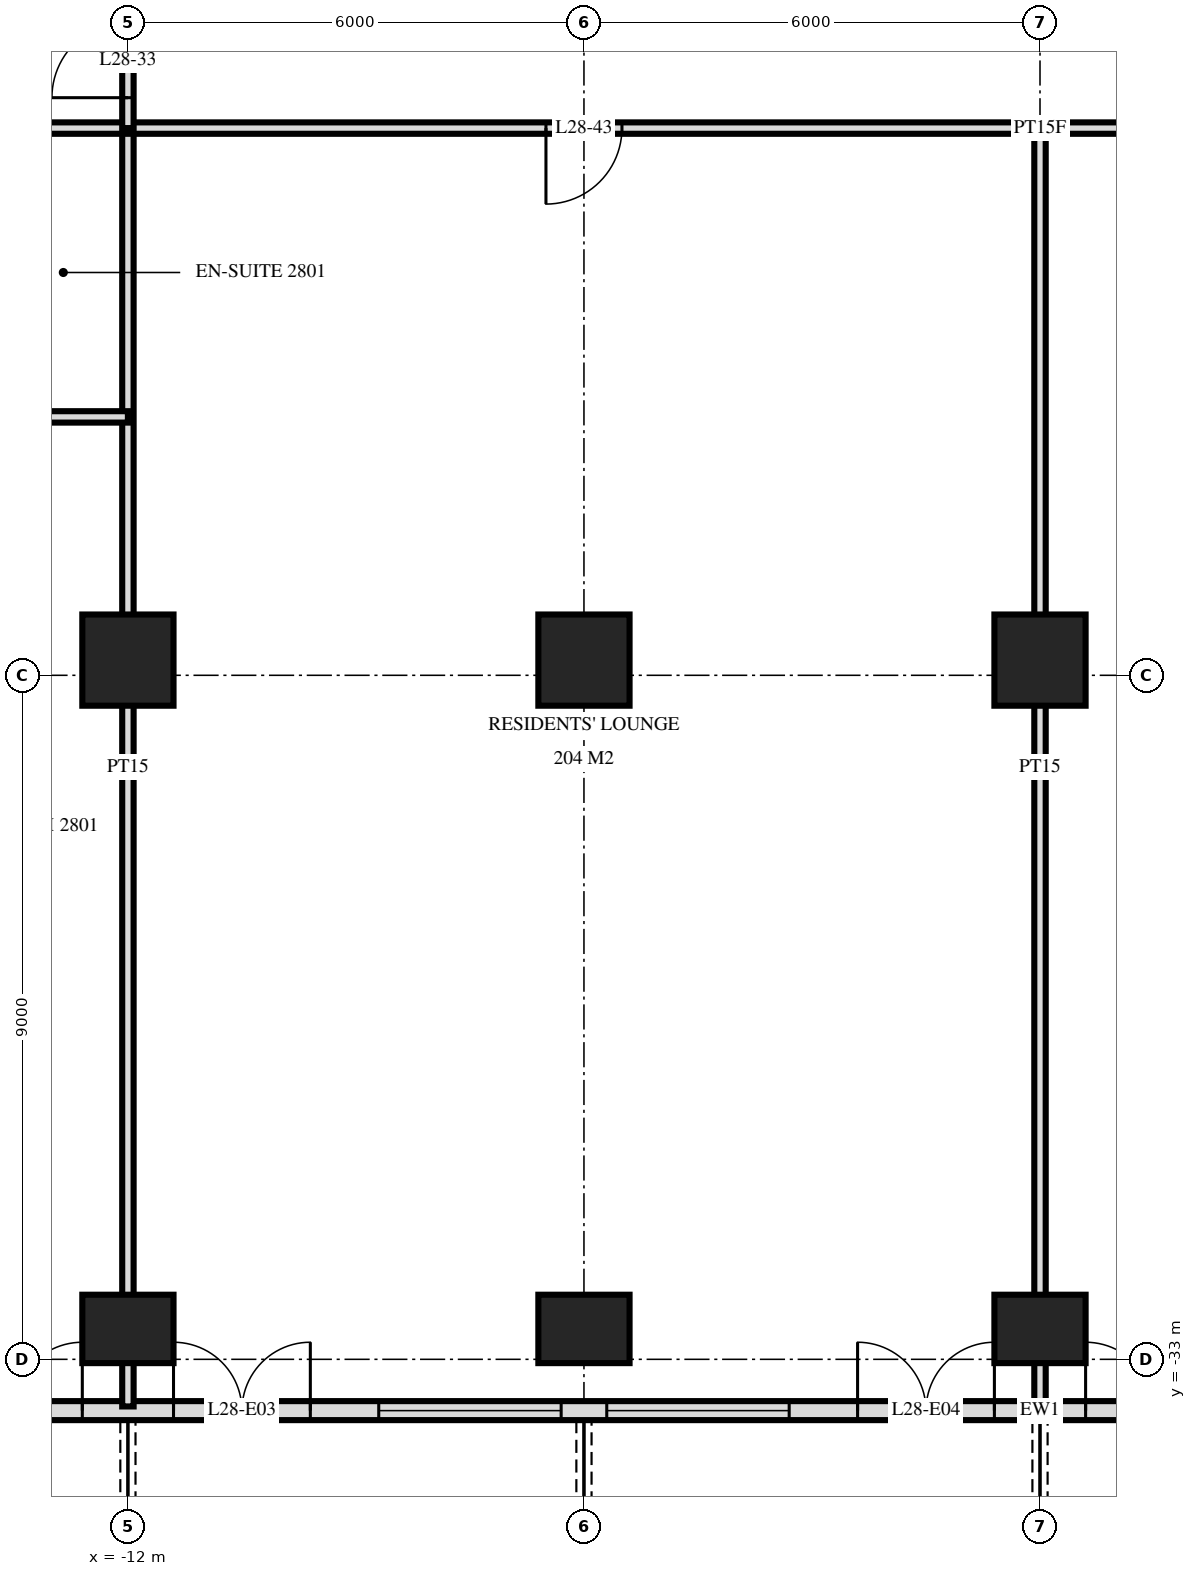
"""IFC4 building model, lengths in metres.
Left out: names, types, materials, properties, quantities, classifications, styles, units other than length and angle.
Written with IfcOpenShell. Run it as: python <this file> out.ifc"""

import sys

from ifc_helpers import new_model, si_unit, direction, frame, frame_2d, origin, origin_2d, place, context, subcontext, project, spatial, rectangle, extrude, element, fill, save


model = new_model("IFC4")
c1 = context("Model", 3, precision=1e-05, world=origin(), true_north=direction((0.0, 1.0)))
c2 = subcontext(c1, "Body", "Model", "MODEL_VIEW")
j1 = project(units=[si_unit("LENGTHUNIT", "METRE"), si_unit("PLANEANGLEUNIT", "RADIAN")], contexts=[c1])
p1 = place(None, origin())
s1 = spatial("IfcSite", under=j1, at=p1, CompositionType="ELEMENT")
p2 = place(p1, origin())
s2 = spatial("IfcBuilding", under=s1, at=p2, CompositionType="ELEMENT")
p3 = place(p2, frame((0.0, 0.0, 112.8)))
s3 = spatial("IfcBuildingStorey", under=s2, at=p3, CompositionType="ELEMENT", Elevation=112.8)
p4 = place(p3, frame((-12.0, -32.6, -0.28), z_axis=(0.0, 0.0, 1.0), x_axis=(1.0, 0.0, 0.0)))
e1 = element("IfcColumn", 1, at=p4, inside=s3, PredefinedType="COLUMN", context=c2, shape_type="SweptSolid", body=[
    extrude(rectangle(XDim=1.2, YDim=0.9, at=origin_2d()), origin(), (0.0, 0.0, 1.0), 3.88),
])
p5 = place(p3, frame((-12.0, -23.8, -0.28), z_axis=(0.0, 0.0, 1.0), x_axis=(1.0, 0.0, 0.0)))
e2 = element("IfcColumn", 2, at=p5, inside=s3, PredefinedType="COLUMN", context=c2, shape_type="SweptSolid", body=[
    extrude(rectangle(XDim=1.2, YDim=1.2, at=origin_2d()), origin(), (0.0, 0.0, 1.0), 3.88),
])
p6 = place(p3, frame((-6.0, -32.6, -0.28), z_axis=(0.0, 0.0, 1.0), x_axis=(1.0, 0.0, 0.0)))
e3 = element("IfcColumn", 3, at=p6, inside=s3, PredefinedType="COLUMN", context=c2, shape_type="SweptSolid", body=[
    extrude(rectangle(XDim=1.2, YDim=0.9, at=origin_2d()), origin(), (0.0, 0.0, 1.0), 3.88),
])
p7 = place(p3, frame((-6.0, -23.8, -0.28), z_axis=(0.0, 0.0, 1.0), x_axis=(1.0, 0.0, 0.0)))
e4 = element("IfcColumn", 4, at=p7, inside=s3, PredefinedType="COLUMN", context=c2, shape_type="SweptSolid", body=[
    extrude(rectangle(XDim=1.2, YDim=1.2, at=origin_2d()), origin(), (0.0, 0.0, 1.0), 3.88),
])
p8 = place(p3, frame((0.0, -32.6, -0.28), z_axis=(0.0, 0.0, 1.0), x_axis=(1.0, 0.0, 0.0)))
e5 = element("IfcColumn", 5, at=p8, inside=s3, PredefinedType="COLUMN", context=c2, shape_type="SweptSolid", body=[
    extrude(rectangle(XDim=1.2, YDim=0.9, at=origin_2d()), origin(), (0.0, 0.0, 1.0), 3.88),
])
p9 = place(p3, frame((0.0, -23.8, -0.28), z_axis=(0.0, 0.0, 1.0), x_axis=(1.0, 0.0, 0.0)))
e6 = element("IfcColumn", 6, at=p9, inside=s3, PredefinedType="COLUMN", context=c2, shape_type="SweptSolid", body=[
    extrude(rectangle(XDim=1.2, YDim=1.2, at=origin_2d()), origin(), (0.0, 0.0, 1.0), 3.88),
])
p10 = place(p3, frame((-23.675, -33.675, 0.0), z_axis=(0.0, 0.0, 1.0), x_axis=(1.0, 0.0, 0.0)))
e7 = element("IfcWall", 7, at=p10, inside=s3, PredefinedType="SOLIDWALL", context=c2, shape_type="SweptSolid", body=[
    extrude(rectangle(XDim=47.351, YDim=0.25, at=frame_2d((23.675, 0.0))), origin(), (0.0, 0.0, 1.0), 3.32),
])
p11 = place(p10, frame((0.275, 0.0, 0.3)))
e8 = element("IfcOpeningElement", 8, at=p11, cuts=e7, PredefinedType="OPENING", context=c2, shape_type="SweptSolid", body=[
    extrude(rectangle(XDim=2.4, YDim=2.1, at=frame_2d((1.2, 1.05))), frame((0.0, 0.135, 0.0), z_axis=(0.0, -1.0, 0.0), x_axis=(1.0, 0.0, 0.0)), (0.0, 0.0, 1.0), 0.27),
])
p12 = place(p10, frame((3.425, 0.0, 0.0)))
e9 = element("IfcOpeningElement", 9, at=p12, cuts=e7, PredefinedType="OPENING", context=c2, shape_type="SweptSolid", body=[
    extrude(rectangle(XDim=1.8, YDim=2.4, at=frame_2d((0.9, 1.2))), frame((0.0, 0.135, 0.0), z_axis=(0.0, -1.0, 0.0), x_axis=(1.0, 0.0, 0.0)), (0.0, 0.0, 1.0), 0.27),
])
p13 = place(p10, frame((5.975, 0.0, 0.3)))
e10 = element("IfcOpeningElement", 10, at=p13, cuts=e7, PredefinedType="OPENING", context=c2, shape_type="SweptSolid", body=[
    extrude(rectangle(XDim=2.4, YDim=2.1, at=frame_2d((1.2, 1.05))), frame((0.0, 0.135, 0.0), z_axis=(0.0, -1.0, 0.0), x_axis=(1.0, 0.0, 0.0)), (0.0, 0.0, 1.0), 0.27),
])
p14 = place(p10, frame((9.275, 0.0, 0.0)))
e11 = element("IfcOpeningElement", 11, at=p14, cuts=e7, PredefinedType="OPENING", context=c2, shape_type="SweptSolid", body=[
    extrude(rectangle(XDim=1.8, YDim=2.4, at=frame_2d((0.9, 1.2))), frame((0.0, 0.135, 0.0), z_axis=(0.0, -1.0, 0.0), x_axis=(1.0, 0.0, 0.0)), (0.0, 0.0, 1.0), 0.27),
])
p15 = place(p10, frame((12.275, 0.0, 0.0)))
e12 = element("IfcOpeningElement", 12, at=p15, cuts=e7, PredefinedType="OPENING", context=c2, shape_type="SweptSolid", body=[
    extrude(rectangle(XDim=1.8, YDim=2.4, at=frame_2d((0.9, 1.2))), frame((0.0, 0.135, 0.0), z_axis=(0.0, -1.0, 0.0), x_axis=(1.0, 0.0, 0.0)), (0.0, 0.0, 1.0), 0.27),
])
p16 = place(p10, frame((14.975, 0.0, 0.3)))
e13 = element("IfcOpeningElement", 13, at=p16, cuts=e7, PredefinedType="OPENING", context=c2, shape_type="SweptSolid", body=[
    extrude(rectangle(XDim=2.4, YDim=2.1, at=frame_2d((1.2, 1.05))), frame((0.0, 0.135, 0.0), z_axis=(0.0, -1.0, 0.0), x_axis=(1.0, 0.0, 0.0)), (0.0, 0.0, 1.0), 0.27),
])
p17 = place(p10, frame((17.975, 0.0, 0.3)))
e14 = element("IfcOpeningElement", 14, at=p17, cuts=e7, PredefinedType="OPENING", context=c2, shape_type="SweptSolid", body=[
    extrude(rectangle(XDim=2.4, YDim=2.1, at=frame_2d((1.2, 1.05))), frame((0.0, 0.135, 0.0), z_axis=(0.0, -1.0, 0.0), x_axis=(1.0, 0.0, 0.0)), (0.0, 0.0, 1.0), 0.27),
])
p18 = place(p10, frame((21.275, 0.0, 0.0)))
e15 = element("IfcOpeningElement", 15, at=p18, cuts=e7, PredefinedType="OPENING", context=c2, shape_type="SweptSolid", body=[
    extrude(rectangle(XDim=1.8, YDim=2.4, at=frame_2d((0.9, 1.2))), frame((0.0, 0.135, 0.0), z_axis=(0.0, -1.0, 0.0), x_axis=(1.0, 0.0, 0.0)), (0.0, 0.0, 1.0), 0.27),
])
p19 = place(p10, frame((24.275, 0.0, 0.0)))
e16 = element("IfcOpeningElement", 16, at=p19, cuts=e7, PredefinedType="OPENING", context=c2, shape_type="SweptSolid", body=[
    extrude(rectangle(XDim=1.8, YDim=2.4, at=frame_2d((0.9, 1.2))), frame((0.0, 0.135, 0.0), z_axis=(0.0, -1.0, 0.0), x_axis=(1.0, 0.0, 0.0)), (0.0, 0.0, 1.0), 0.27),
])
p20 = place(p10, frame((26.975, 0.0, 0.3)))
e17 = element("IfcOpeningElement", 17, at=p20, cuts=e7, PredefinedType="OPENING", context=c2, shape_type="SweptSolid", body=[
    extrude(rectangle(XDim=2.4, YDim=2.1, at=frame_2d((1.2, 1.05))), frame((0.0, 0.135, 0.0), z_axis=(0.0, -1.0, 0.0), x_axis=(1.0, 0.0, 0.0)), (0.0, 0.0, 1.0), 0.27),
])
p21 = place(p10, frame((30.275, 0.0, 0.0)))
e18 = element("IfcOpeningElement", 18, at=p21, cuts=e7, PredefinedType="OPENING", context=c2, shape_type="SweptSolid", body=[
    extrude(rectangle(XDim=1.8, YDim=2.4, at=frame_2d((0.9, 1.2))), frame((0.0, 0.135, 0.0), z_axis=(0.0, -1.0, 0.0), x_axis=(1.0, 0.0, 0.0)), (0.0, 0.0, 1.0), 0.27),
])
p22 = place(p10, frame((32.975, 0.0, 0.3)))
e19 = element("IfcOpeningElement", 19, at=p22, cuts=e7, PredefinedType="OPENING", context=c2, shape_type="SweptSolid", body=[
    extrude(rectangle(XDim=2.4, YDim=2.1, at=frame_2d((1.2, 1.05))), frame((0.0, 0.135, 0.0), z_axis=(0.0, -1.0, 0.0), x_axis=(1.0, 0.0, 0.0)), (0.0, 0.0, 1.0), 0.27),
])
p23 = place(p10, frame((35.975, 0.0, 0.3)))
e20 = element("IfcOpeningElement", 20, at=p23, cuts=e7, PredefinedType="OPENING", context=c2, shape_type="SweptSolid", body=[
    extrude(rectangle(XDim=2.4, YDim=2.1, at=frame_2d((1.2, 1.05))), frame((0.0, 0.135, 0.0), z_axis=(0.0, -1.0, 0.0), x_axis=(1.0, 0.0, 0.0)), (0.0, 0.0, 1.0), 0.27),
])
p24 = place(p10, frame((39.275, 0.0, 0.0)))
e21 = element("IfcOpeningElement", 21, at=p24, cuts=e7, PredefinedType="OPENING", context=c2, shape_type="SweptSolid", body=[
    extrude(rectangle(XDim=1.8, YDim=2.4, at=frame_2d((0.9, 1.2))), frame((0.0, 0.135, 0.0), z_axis=(0.0, -1.0, 0.0), x_axis=(1.0, 0.0, 0.0)), (0.0, 0.0, 1.0), 0.27),
])
p25 = place(p10, frame((41.975, 0.0, 0.3)))
e22 = element("IfcOpeningElement", 22, at=p25, cuts=e7, PredefinedType="OPENING", context=c2, shape_type="SweptSolid", body=[
    extrude(rectangle(XDim=2.4, YDim=2.1, at=frame_2d((1.2, 1.05))), frame((0.0, 0.135, 0.0), z_axis=(0.0, -1.0, 0.0), x_axis=(1.0, 0.0, 0.0)), (0.0, 0.0, 1.0), 0.27),
])
p26 = place(p10, frame((45.125, 0.0, 0.0)))
e23 = element("IfcOpeningElement", 23, at=p26, cuts=e7, PredefinedType="OPENING", context=c2, shape_type="SweptSolid", body=[
    extrude(rectangle(XDim=1.8, YDim=2.4, at=frame_2d((0.9, 1.2))), frame((0.0, 0.135, 0.0), z_axis=(0.0, -1.0, 0.0), x_axis=(1.0, 0.0, 0.0)), (0.0, 0.0, 1.0), 0.27),
])
p27 = place(p3, frame((0.0, -33.62, 0.0), z_axis=(0.0, 0.0, 1.0), x_axis=(0.0, 1.0, 0.0)))
e24 = element("IfcWall", 24, at=p27, inside=s3, PredefinedType="PARTITIONING", context=c2, shape_type="SweptSolid", body=[
    extrude(rectangle(XDim=16.82, YDim=0.15, at=frame_2d((8.41, 0.0))), origin(), (0.0, 0.0, 1.0), 3.32),
])
p28 = place(p3, frame((-12.0, -16.8, 0.0), z_axis=(0.0, 0.0, 1.0), x_axis=(0.0, 1.0, 0.0)))
e25 = element("IfcWall", 25, at=p28, inside=s3, PredefinedType="PARTITIONING", context=c2, shape_type="SweptSolid", body=[
    extrude(rectangle(XDim=1.75, YDim=0.15, at=frame_2d((0.875, 0.0))), origin(), (0.0, 0.0, 1.0), 3.32),
])
p29 = place(p28, frame((0.4, 0.0, 0.0)))
e26 = element("IfcOpeningElement", 26, at=p29, cuts=e25, PredefinedType="OPENING", context=c2, shape_type="SweptSolid", body=[
    extrude(rectangle(XDim=1.0, YDim=2.1, at=frame_2d((0.5, 1.05))), frame((0.0, 0.085, 0.0), z_axis=(0.0, -1.0, 0.0), x_axis=(1.0, 0.0, 0.0)), (0.0, 0.0, 1.0), 0.17),
])
p30 = place(p3, frame((-12.0, -33.62, 0.0), z_axis=(0.0, 0.0, 1.0), x_axis=(0.0, 1.0, 0.0)))
e27 = element("IfcWall", 27, at=p30, inside=s3, PredefinedType="PARTITIONING", context=c2, shape_type="SweptSolid", body=[
    extrude(rectangle(XDim=16.82, YDim=0.15, at=frame_2d((8.41, 0.0))), origin(), (0.0, 0.0, 1.0), 3.32),
])
p31 = place(p3, frame((-13.7, -20.6, 0.0), z_axis=(0.0, 0.0, 1.0), x_axis=(1.0, 0.0, 0.0)))
e28 = element("IfcWall", 28, at=p31, inside=s3, PredefinedType="PARTITIONING", context=c2, shape_type="SweptSolid", body=[
    extrude(rectangle(XDim=1.7, YDim=0.15, at=frame_2d((0.85, 0.0))), origin(), (0.0, 0.0, 1.0), 3.32),
])
p32 = place(p3, frame((-28.02, -16.8, 0.0), z_axis=(0.0, 0.0, 1.0), x_axis=(1.0, 0.0, 0.0)))
e29 = element("IfcWall", 29, at=p32, inside=s3, PredefinedType="PARTITIONING", context=c2, shape_type="SweptSolid", body=[
    extrude(rectangle(XDim=56.04, YDim=0.15, at=frame_2d((28.02, 0.0))), origin(), (0.0, 0.0, 1.0), 3.32),
])
p33 = place(p32, frame((13.17, 0.0, 0.0)))
e30 = element("IfcOpeningElement", 30, at=p33, cuts=e29, PredefinedType="OPENING", context=c2, shape_type="SweptSolid", body=[
    extrude(rectangle(XDim=1.0, YDim=2.1, at=frame_2d((0.5, 1.05))), frame((0.0, 0.085, 0.0), z_axis=(0.0, -1.0, 0.0), x_axis=(1.0, 0.0, 0.0)), (0.0, 0.0, 1.0), 0.17),
])
p34 = place(p32, frame((11.87, 0.0, 0.0)))
e31 = element("IfcOpeningElement", 31, at=p34, cuts=e29, PredefinedType="OPENING", context=c2, shape_type="SweptSolid", body=[
    extrude(rectangle(XDim=1.0, YDim=2.1, at=frame_2d((0.5, 1.05))), frame((0.0, 0.085, 0.0), z_axis=(0.0, -1.0, 0.0), x_axis=(1.0, 0.0, 0.0)), (0.0, 0.0, 1.0), 0.17),
])
p35 = place(p32, frame((8.32, 0.0, 0.0)))
e32 = element("IfcOpeningElement", 32, at=p35, cuts=e29, PredefinedType="OPENING", context=c2, shape_type="SweptSolid", body=[
    extrude(rectangle(XDim=1.0, YDim=2.1, at=frame_2d((0.5, 1.05))), frame((0.0, 0.085, 0.0), z_axis=(0.0, -1.0, 0.0), x_axis=(1.0, 0.0, 0.0)), (0.0, 0.0, 1.0), 0.17),
])
p36 = place(p32, frame((40.42, 0.0, 0.0)))
e33 = element("IfcOpeningElement", 33, at=p36, cuts=e29, PredefinedType="OPENING", context=c2, shape_type="SweptSolid", body=[
    extrude(rectangle(XDim=1.0, YDim=2.1, at=frame_2d((0.5, 1.05))), frame((0.0, 0.085, 0.0), z_axis=(0.0, -1.0, 0.0), x_axis=(1.0, 0.0, 0.0)), (0.0, 0.0, 1.0), 0.17),
])
p37 = place(p32, frame((46.72, 0.0, 0.0)))
e34 = element("IfcOpeningElement", 34, at=p37, cuts=e29, PredefinedType="OPENING", context=c2, shape_type="SweptSolid", body=[
    extrude(rectangle(XDim=1.0, YDim=2.1, at=frame_2d((0.5, 1.05))), frame((0.0, 0.085, 0.0), z_axis=(0.0, -1.0, 0.0), x_axis=(1.0, 0.0, 0.0)), (0.0, 0.0, 1.0), 0.17),
])
p38 = place(p32, frame((21.52, 0.0, 0.0)))
e35 = element("IfcOpeningElement", 35, at=p38, cuts=e29, PredefinedType="OPENING", context=c2, shape_type="SweptSolid", body=[
    extrude(rectangle(XDim=1.0, YDim=2.1, at=frame_2d((0.5, 1.05))), frame((0.0, 0.085, 0.0), z_axis=(0.0, -1.0, 0.0), x_axis=(1.0, 0.0, 0.0)), (0.0, 0.0, 1.0), 0.17),
])
p39 = place(p32, frame((30.52, 0.0, 0.0)))
e36 = element("IfcOpeningElement", 36, at=p39, cuts=e29, PredefinedType="OPENING", context=c2, shape_type="SweptSolid", body=[
    extrude(rectangle(XDim=1.0, YDim=2.1, at=frame_2d((0.5, 1.05))), frame((0.0, 0.085, 0.0), z_axis=(0.0, -1.0, 0.0), x_axis=(1.0, 0.0, 0.0)), (0.0, 0.0, 1.0), 0.17),
])
p40 = place(p32, frame((36.52, 0.0, 0.0)))
e37 = element("IfcOpeningElement", 37, at=p40, cuts=e29, PredefinedType="OPENING", context=c2, shape_type="SweptSolid", body=[
    extrude(rectangle(XDim=1.0, YDim=2.1, at=frame_2d((0.5, 1.05))), frame((0.0, 0.085, 0.0), z_axis=(0.0, -1.0, 0.0), x_axis=(1.0, 0.0, 0.0)), (0.0, 0.0, 1.0), 0.17),
])
p41 = place(p14, origin())
e38 = element("IfcDoor", 38, at=p41, inside=s3, OperationType="DOUBLE_DOOR_SINGLE_SWING", PredefinedType="DOOR", context=c2, shape_type="SweptSolid", body=[
    extrude(rectangle(XDim=1.8, YDim=2.4, at=frame_2d((0.9, 1.2))), frame((0.0, 0.025, 0.0), z_axis=(0.0, -1.0, 0.0), x_axis=(1.0, 0.0, 0.0)), (0.0, 0.0, 1.0), 0.05),
])
fill(e11, e38)
p42 = place(p15, origin())
e39 = element("IfcDoor", 39, at=p42, inside=s3, OperationType="DOUBLE_DOOR_SINGLE_SWING", PredefinedType="DOOR", context=c2, shape_type="SweptSolid", body=[
    extrude(rectangle(XDim=1.8, YDim=2.4, at=frame_2d((0.9, 1.2))), frame((0.0, 0.025, 0.0), z_axis=(0.0, -1.0, 0.0), x_axis=(1.0, 0.0, 0.0)), (0.0, 0.0, 1.0), 0.05),
])
fill(e12, e39)
p43 = place(p16, origin())
e40 = element("IfcWindow", 40, at=p43, inside=s3, PartitioningType="SINGLE_PANEL", PredefinedType="WINDOW", context=c2, shape_type="SweptSolid", body=[
    extrude(rectangle(XDim=2.4, YDim=2.1, at=frame_2d((1.2, 1.05))), frame((0.0, 0.03, 0.0), z_axis=(0.0, -1.0, 0.0), x_axis=(1.0, 0.0, 0.0)), (0.0, 0.0, 1.0), 0.06),
])
fill(e13, e40)
p44 = place(p17, origin())
e41 = element("IfcWindow", 41, at=p44, inside=s3, PartitioningType="SINGLE_PANEL", PredefinedType="WINDOW", context=c2, shape_type="SweptSolid", body=[
    extrude(rectangle(XDim=2.4, YDim=2.1, at=frame_2d((1.2, 1.05))), frame((0.0, 0.03, 0.0), z_axis=(0.0, -1.0, 0.0), x_axis=(1.0, 0.0, 0.0)), (0.0, 0.0, 1.0), 0.06),
])
fill(e14, e41)
p45 = place(p18, origin())
e42 = element("IfcDoor", 42, at=p45, inside=s3, OperationType="DOUBLE_DOOR_SINGLE_SWING", PredefinedType="DOOR", context=c2, shape_type="SweptSolid", body=[
    extrude(rectangle(XDim=1.8, YDim=2.4, at=frame_2d((0.9, 1.2))), frame((0.0, 0.025, 0.0), z_axis=(0.0, -1.0, 0.0), x_axis=(1.0, 0.0, 0.0)), (0.0, 0.0, 1.0), 0.05),
])
fill(e15, e42)
p46 = place(p19, origin())
e43 = element("IfcDoor", 43, at=p46, inside=s3, OperationType="DOUBLE_DOOR_SINGLE_SWING", PredefinedType="DOOR", context=c2, shape_type="SweptSolid", body=[
    extrude(rectangle(XDim=1.8, YDim=2.4, at=frame_2d((0.9, 1.2))), frame((0.0, 0.025, 0.0), z_axis=(0.0, -1.0, 0.0), x_axis=(1.0, 0.0, 0.0)), (0.0, 0.0, 1.0), 0.05),
])
fill(e16, e43)
p47 = place(p29, origin())
e44 = element("IfcDoor", 44, at=p47, inside=s3, OperationType="SINGLE_SWING_RIGHT", PredefinedType="DOOR", context=c2, shape_type="SweptSolid", body=[
    extrude(rectangle(XDim=1.0, YDim=2.1, at=frame_2d((0.5, 1.05))), frame((0.0, 0.025, 0.0), z_axis=(0.0, -1.0, 0.0), x_axis=(1.0, 0.0, 0.0)), (0.0, 0.0, 1.0), 0.05),
])
fill(e26, e44)
p48 = place(p38, frame((0.5, 0.0, 0.0), z_axis=(0.0, 0.0, 1.0), x_axis=(-1.0, 0.0, 0.0)))
e45 = element("IfcDoor", 45, at=p48, inside=s3, OperationType="SINGLE_SWING_LEFT", PredefinedType="DOOR", context=c2, shape_type="SweptSolid", body=[
    extrude(rectangle(XDim=1.0, YDim=2.1, at=frame_2d((0.0, 1.05))), frame((0.0, -0.025, 0.0), z_axis=(0.0, 1.0, 0.0), x_axis=(-1.0, 0.0, 0.0)), (0.0, 0.0, 1.0), 0.05),
])
fill(e35, e45)
save(model, sys.argv[1])
